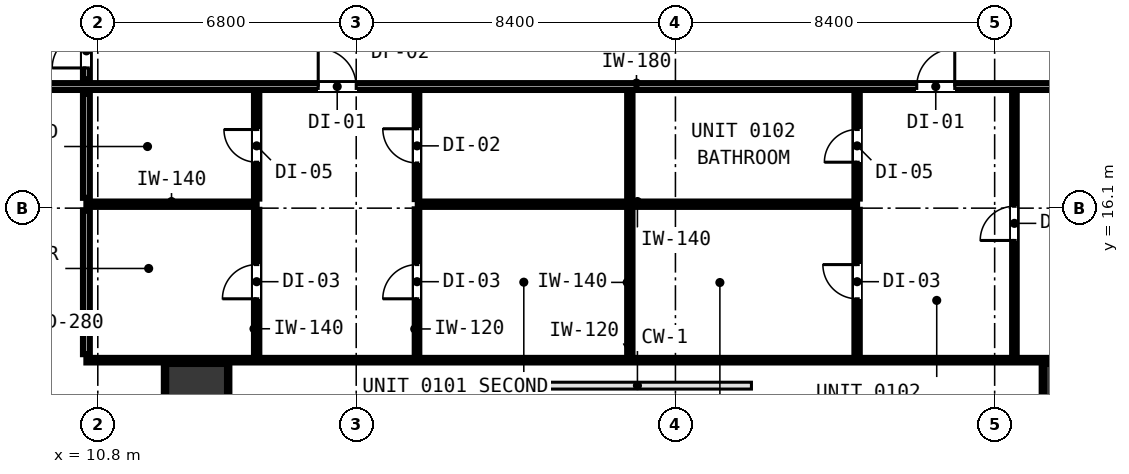
"""IFC4 building model, lengths in metres.
Left out: names, types, materials, properties, quantities, classifications, styles, units other than length and angle.
Written with IfcOpenShell. Run it as: python <this file> out.ifc"""

import sys

from ifc_helpers import new_model, si_unit, direction, frame, frame_2d, origin, origin_2d, place, context, subcontext, project, spatial, rectangle, extrude, element, fill, save


model = new_model("IFC4")
c1 = context("Model", 3, precision=1e-05, world=origin(), true_north=direction((0.0, 1.0)))
c2 = subcontext(c1, "Body", "Model", "MODEL_VIEW")
j1 = project(units=[si_unit("LENGTHUNIT", "METRE"), si_unit("PLANEANGLEUNIT", "RADIAN")], contexts=[c1])
p1 = place(None, origin())
s1 = spatial("IfcSite", under=j1, at=p1, CompositionType="ELEMENT")
p2 = place(p1, origin())
s2 = spatial("IfcBuilding", under=s1, at=p2, CompositionType="ELEMENT")
p3 = place(p2, frame((0.0, 0.0, 5.2)))
s3 = spatial("IfcBuildingStorey", under=s2, at=p3, CompositionType="ELEMENT", Elevation=5.2)
for number, where, z_axis, x_axis in (
    (1, (13.4, 11.2, 0.0), (0.0, 0.0, 1.0), (1.0, 0.0, 0.0)),
    (2, (36.5, 11.2, 0.0), (0.0, 0.0, 1.0), (1.0, 0.0, 0.0)),
):
    element("IfcColumn", number, at=place(p3, frame(where, z_axis=z_axis, x_axis=x_axis)), inside=s3, PredefinedType="COLUMN", context=c2, shape_type="SweptSolid", body=[
        extrude(rectangle(XDim=1.6, YDim=1.6, at=origin_2d()), origin(), (0.0, 0.0, 1.0), 4.2),
    ])
p4 = place(p3, frame((4.352, 19.3, 0.0), z_axis=(0.0, 0.0, 1.0), x_axis=(1.0, 0.0, 0.0)))
e3 = element("IfcWall", 3, at=p4, inside=s3, PredefinedType="PARTITIONING", context=c2, shape_type="SweptSolid", body=[
    extrude(rectangle(XDim=43.296, YDim=0.18, at=frame_2d((21.648, 0.0))), origin(), (0.0, 0.0, 1.0), 3.92),
])
p5 = place(p4, frame((12.248, 0.0, 0.0)))
e4 = element("IfcOpeningElement", 4, at=p5, cuts=e3, PredefinedType="OPENING", context=c2, shape_type="SweptSolid", body=[
    extrude(rectangle(XDim=1.0, YDim=2.15, at=frame_2d((0.5, 1.075))), frame((0.0, 0.1, 0.0), z_axis=(0.0, -1.0, 0.0), x_axis=(1.0, 0.0, 0.0)), (0.0, 0.0, 1.0), 0.2),
])
p6 = place(p4, frame((27.998, 0.0, 0.0)))
e5 = element("IfcOpeningElement", 5, at=p6, cuts=e3, PredefinedType="OPENING", context=c2, shape_type="SweptSolid", body=[
    extrude(rectangle(XDim=1.0, YDim=2.15, at=frame_2d((0.5, 1.075))), frame((0.0, 0.1, 0.0), z_axis=(0.0, -1.0, 0.0), x_axis=(1.0, 0.0, 0.0)), (0.0, 0.0, 1.0), 0.2),
])
p7 = place(p3, frame((10.5, 16.204, 0.0), z_axis=(0.0, 0.0, 1.0), x_axis=(1.0, 0.0, 0.0)))
e6 = element("IfcWall", 6, at=p7, inside=s3, PredefinedType="PARTITIONING", context=c2, shape_type="SweptSolid", body=[
    extrude(rectangle(XDim=4.48, YDim=0.14, at=frame_2d((2.24, 0.0))), origin(), (0.0, 0.0, 1.0), 3.92),
])
p8 = place(p3, frame((19.22, 16.204, 0.0), z_axis=(0.0, 0.0, 1.0), x_axis=(1.0, 0.0, 0.0)))
e7 = element("IfcWall", 7, at=p8, inside=s3, PredefinedType="PARTITIONING", context=c2, shape_type="SweptSolid", body=[
    extrude(rectangle(XDim=11.56, YDim=0.14, at=frame_2d((5.78, 0.0))), origin(), (0.0, 0.0, 1.0), 3.92),
])
p9 = place(p3, frame((10.5, 12.1, 0.0), z_axis=(0.0, 0.0, 1.0), x_axis=(1.0, 0.0, 0.0)))
e8 = element("IfcWall", 8, at=p9, inside=s3, PredefinedType="PARTITIONING", context=c2, shape_type="SweptSolid", body=[
    extrude(rectangle(XDim=28.7, YDim=0.12, at=frame_2d((14.35, 0.0))), origin(), (0.0, 0.0, 1.0), 3.92),
])
p10 = place(p3, frame((10.5, 12.258, 0.0), z_axis=(0.0, 0.0, 1.0), x_axis=(0.0, 1.0, 0.0)))
e9 = element("IfcWall", 9, at=p10, inside=s3, PredefinedType="PARTITIONING", context=c2, shape_type="SweptSolid", body=[
    extrude(rectangle(XDim=3.778, YDim=0.18, at=frame_2d((1.889, 0.0))), origin(), (0.0, 0.0, 1.0), 3.92),
])
p11 = place(p3, frame((10.5, 16.372, 0.0), z_axis=(0.0, 0.0, 1.0), x_axis=(0.0, 1.0, 0.0)))
e10 = element("IfcWall", 10, at=p11, inside=s3, PredefinedType="PARTITIONING", context=c2, shape_type="SweptSolid", body=[
    extrude(rectangle(XDim=2.74, YDim=0.18, at=frame_2d((1.37, 0.0))), origin(), (0.0, 0.0, 1.0), 3.92),
])
p12 = place(p3, frame((10.5, 19.488, 0.0), z_axis=(0.0, 0.0, 1.0), x_axis=(0.0, 1.0, 0.0)))
e11 = element("IfcWall", 11, at=p12, inside=s3, PredefinedType="PARTITIONING", context=c2, shape_type="SweptSolid", body=[
    extrude(rectangle(XDim=1.444, YDim=0.18, at=frame_2d((0.722, 0.0))), origin(), (0.0, 0.0, 1.0), 3.92),
])
p13 = place(p12, frame((0.301, 0.0, 0.0)))
e12 = element("IfcOpeningElement", 12, at=p13, cuts=e11, PredefinedType="OPENING", context=c2, shape_type="SweptSolid", body=[
    extrude(rectangle(XDim=0.9, YDim=2.1, at=frame_2d((0.45, 1.05))), frame((0.0, 0.1, 0.0), z_axis=(0.0, -1.0, 0.0), x_axis=(1.0, 0.0, 0.0)), (0.0, 0.0, 1.0), 0.2),
])
p14 = place(p3, frame((14.98, 12.238, 0.0), z_axis=(0.0, 0.0, 1.0), x_axis=(0.0, 1.0, 0.0)))
e13 = element("IfcWall", 13, at=p14, inside=s3, PredefinedType="PARTITIONING", context=c2, shape_type="SweptSolid", body=[
    extrude(rectangle(XDim=3.818, YDim=0.14, at=frame_2d((1.909, 0.0))), origin(), (0.0, 0.0, 1.0), 3.92),
])
p15 = place(p14, frame((1.477, 0.0, 0.0)))
e14 = element("IfcOpeningElement", 14, at=p15, cuts=e13, PredefinedType="OPENING", context=c2, shape_type="SweptSolid", body=[
    extrude(rectangle(XDim=0.9, YDim=2.1, at=frame_2d((0.45, 1.05))), frame((0.0, 0.08, 0.0), z_axis=(0.0, -1.0, 0.0), x_axis=(1.0, 0.0, 0.0)), (0.0, 0.0, 1.0), 0.16),
])
p16 = place(p3, frame((14.98, 16.352, 0.0), z_axis=(0.0, 0.0, 1.0), x_axis=(0.0, 1.0, 0.0)))
e15 = element("IfcWall", 15, at=p16, inside=s3, PredefinedType="PARTITIONING", context=c2, shape_type="SweptSolid", body=[
    extrude(rectangle(XDim=2.78, YDim=0.14, at=frame_2d((1.39, 0.0))), origin(), (0.0, 0.0, 1.0), 3.92),
])
p17 = place(p16, frame((0.957, 0.0, 0.0)))
e16 = element("IfcOpeningElement", 16, at=p17, cuts=e15, PredefinedType="OPENING", context=c2, shape_type="SweptSolid", body=[
    extrude(rectangle(XDim=0.86, YDim=2.02, at=frame_2d((0.43, 1.01))), frame((0.0, 0.08, 0.0), z_axis=(0.0, -1.0, 0.0), x_axis=(1.0, 0.0, 0.0)), (0.0, 0.0, 1.0), 0.16),
])
p18 = place(p3, frame((24.8, 12.238, 0.0), z_axis=(0.0, 0.0, 1.0), x_axis=(0.0, 1.0, 0.0)))
e17 = element("IfcWall", 17, at=p18, inside=s3, PredefinedType="PARTITIONING", context=c2, shape_type="SweptSolid", body=[
    extrude(rectangle(XDim=3.818, YDim=0.14, at=frame_2d((1.909, 0.0))), origin(), (0.0, 0.0, 1.0), 3.92),
])
p19 = place(p3, frame((24.8, 16.352, 0.0), z_axis=(0.0, 0.0, 1.0), x_axis=(0.0, 1.0, 0.0)))
e18 = element("IfcWall", 18, at=p19, inside=s3, PredefinedType="PARTITIONING", context=c2, shape_type="SweptSolid", body=[
    extrude(rectangle(XDim=2.78, YDim=0.14, at=frame_2d((1.39, 0.0))), origin(), (0.0, 0.0, 1.0), 3.92),
])
p20 = place(p3, frame((30.78, 12.238, 0.0), z_axis=(0.0, 0.0, 1.0), x_axis=(0.0, 1.0, 0.0)))
e19 = element("IfcWall", 19, at=p20, inside=s3, PredefinedType="PARTITIONING", context=c2, shape_type="SweptSolid", body=[
    extrude(rectangle(XDim=3.818, YDim=0.14, at=frame_2d((1.909, 0.0))), origin(), (0.0, 0.0, 1.0), 3.92),
])
p21 = place(p20, frame((1.477, 0.0, 0.0)))
e20 = element("IfcOpeningElement", 20, at=p21, cuts=e19, PredefinedType="OPENING", context=c2, shape_type="SweptSolid", body=[
    extrude(rectangle(XDim=0.9, YDim=2.1, at=frame_2d((0.45, 1.05))), frame((0.0, 0.08, 0.0), z_axis=(0.0, -1.0, 0.0), x_axis=(1.0, 0.0, 0.0)), (0.0, 0.0, 1.0), 0.16),
])
p22 = place(p3, frame((30.78, 16.352, 0.0), z_axis=(0.0, 0.0, 1.0), x_axis=(0.0, 1.0, 0.0)))
e21 = element("IfcWall", 21, at=p22, inside=s3, PredefinedType="PARTITIONING", context=c2, shape_type="SweptSolid", body=[
    extrude(rectangle(XDim=2.78, YDim=0.14, at=frame_2d((1.39, 0.0))), origin(), (0.0, 0.0, 1.0), 3.92),
])
p23 = place(p22, frame((0.957, 0.0, 0.0)))
e22 = element("IfcOpeningElement", 22, at=p23, cuts=e21, PredefinedType="OPENING", context=c2, shape_type="SweptSolid", body=[
    extrude(rectangle(XDim=0.86, YDim=2.02, at=frame_2d((0.43, 1.01))), frame((0.0, 0.08, 0.0), z_axis=(0.0, -1.0, 0.0), x_axis=(1.0, 0.0, 0.0)), (0.0, 0.0, 1.0), 0.16),
])
p24 = place(p3, frame((19.2, 12.228, 0.0), z_axis=(0.0, 0.0, 1.0), x_axis=(0.0, 1.0, 0.0)))
e23 = element("IfcWall", 23, at=p24, inside=s3, PredefinedType="PARTITIONING", context=c2, shape_type="SweptSolid", body=[
    extrude(rectangle(XDim=3.841, YDim=0.12, at=frame_2d((1.92, 0.0))), origin(), (0.0, 0.0, 1.0), 3.92),
])
p25 = place(p24, frame((1.487, 0.0, 0.0)))
e24 = element("IfcOpeningElement", 24, at=p25, cuts=e23, PredefinedType="OPENING", context=c2, shape_type="SweptSolid", body=[
    extrude(rectangle(XDim=0.9, YDim=2.1, at=frame_2d((0.45, 1.05))), frame((0.0, 0.07, 0.0), z_axis=(0.0, -1.0, 0.0), x_axis=(1.0, 0.0, 0.0)), (0.0, 0.0, 1.0), 0.14),
])
p26 = place(p3, frame((19.2, 16.339, 0.0), z_axis=(0.0, 0.0, 1.0), x_axis=(0.0, 1.0, 0.0)))
e25 = element("IfcWall", 25, at=p26, inside=s3, PredefinedType="PARTITIONING", context=c2, shape_type="SweptSolid", body=[
    extrude(rectangle(XDim=2.803, YDim=0.12, at=frame_2d((1.401, 0.0))), origin(), (0.0, 0.0, 1.0), 3.92),
])
p27 = place(p26, frame((0.95, 0.0, 0.0)))
e26 = element("IfcOpeningElement", 26, at=p27, cuts=e25, PredefinedType="OPENING", context=c2, shape_type="SweptSolid", body=[
    extrude(rectangle(XDim=0.9, YDim=2.1, at=frame_2d((0.45, 1.05))), frame((0.0, 0.07, 0.0), z_axis=(0.0, -1.0, 0.0), x_axis=(1.0, 0.0, 0.0)), (0.0, 0.0, 1.0), 0.14),
])
p28 = place(p3, frame((34.92, 12.228, 0.0), z_axis=(0.0, 0.0, 1.0), x_axis=(0.0, 1.0, 0.0)))
e27 = element("IfcWall", 27, at=p28, inside=s3, PredefinedType="PARTITIONING", context=c2, shape_type="SweptSolid", body=[
    extrude(rectangle(XDim=6.914, YDim=0.12, at=frame_2d((3.457, 0.0))), origin(), (0.0, 0.0, 1.0), 3.92),
])
p29 = place(p28, frame((3.022, 0.0, 0.0)))
e28 = element("IfcOpeningElement", 28, at=p29, cuts=e27, PredefinedType="OPENING", context=c2, shape_type="SweptSolid", body=[
    extrude(rectangle(XDim=0.9, YDim=2.1, at=frame_2d((0.45, 1.05))), frame((0.0, 0.07, 0.0), z_axis=(0.0, -1.0, 0.0), x_axis=(1.0, 0.0, 0.0)), (0.0, 0.0, 1.0), 0.14),
])
p30 = place(p3, frame((12.6, 12.032, 0.0), z_axis=(0.0, 0.0, 1.0), x_axis=(1.0, 0.0, 0.0)))
e29 = element("IfcWall", 29, at=p30, inside=s3, PredefinedType="PARTITIONING", context=c2, shape_type="SweptSolid", body=[
    extrude(rectangle(XDim=1.6, YDim=0.06, at=frame_2d((0.8, 0.0))), origin(), (0.0, 0.0, 1.0), 1.45),
])
for number, where, z_axis, x_axis in (
    (30, (12.568, 10.4, 0.0), (0.0, 0.0, 1.0), (0.0, 1.0, 0.0)),
    (31, (14.232, 10.4, 0.0), (0.0, 0.0, 1.0), (0.0, 1.0, 0.0)),
    (32, (35.7, 12.032, 0.0), (0.0, 0.0, 1.0), (1.0, 0.0, 0.0)),
    (33, (35.668, 10.4, 0.0), (0.0, 0.0, 1.0), (0.0, 1.0, 0.0)),
):
    element("IfcWall", number, at=place(p3, frame(where, z_axis=z_axis, x_axis=x_axis)), inside=s3, PredefinedType="PARTITIONING", context=c2, shape_type="SweptSolid", body=[
        extrude(rectangle(XDim=1.6, YDim=0.06, at=frame_2d((0.8, 0.0))), origin(), (0.0, 0.0, 1.0), 1.45),
    ])
p31 = place(p13, origin())
e34 = element("IfcDoor", 34, at=p31, inside=s3, OperationType="SINGLE_SWING_LEFT", PredefinedType="DOOR", context=c2, shape_type="SweptSolid", body=[
    extrude(rectangle(XDim=0.9, YDim=2.1, at=frame_2d((0.45, 1.05))), frame((0.0, 0.025, 0.0), z_axis=(0.0, -1.0, 0.0), x_axis=(1.0, 0.0, 0.0)), (0.0, 0.0, 1.0), 0.05),
])
fill(e12, e34)
p32 = place(p5, origin())
e35 = element("IfcDoor", 35, at=p32, inside=s3, OperationType="SINGLE_SWING_LEFT", PredefinedType="DOOR", context=c2, shape_type="SweptSolid", body=[
    extrude(rectangle(XDim=1.0, YDim=2.15, at=frame_2d((0.5, 1.075))), frame((0.0, 0.025, 0.0), z_axis=(0.0, -1.0, 0.0), x_axis=(1.0, 0.0, 0.0)), (0.0, 0.0, 1.0), 0.05),
])
fill(e4, e35)
p33 = place(p17, origin())
e36 = element("IfcDoor", 36, at=p33, inside=s3, OperationType="SINGLE_SWING_RIGHT", PredefinedType="DOOR", context=c2, shape_type="SweptSolid", body=[
    extrude(rectangle(XDim=0.86, YDim=2.02, at=frame_2d((0.43, 1.01))), frame((0.0, 0.025, 0.0), z_axis=(0.0, -1.0, 0.0), x_axis=(1.0, 0.0, 0.0)), (0.0, 0.0, 1.0), 0.05),
])
fill(e16, e36)
p34 = place(p15, origin())
e37 = element("IfcDoor", 37, at=p34, inside=s3, OperationType="SINGLE_SWING_LEFT", PredefinedType="DOOR", context=c2, shape_type="SweptSolid", body=[
    extrude(rectangle(XDim=0.9, YDim=2.1, at=frame_2d((0.45, 1.05))), frame((0.0, 0.025, 0.0), z_axis=(0.0, -1.0, 0.0), x_axis=(1.0, 0.0, 0.0)), (0.0, 0.0, 1.0), 0.05),
])
fill(e14, e37)
p35 = place(p27, origin())
e38 = element("IfcDoor", 38, at=p35, inside=s3, OperationType="SINGLE_SWING_RIGHT", PredefinedType="DOOR", context=c2, shape_type="SweptSolid", body=[
    extrude(rectangle(XDim=0.9, YDim=2.1, at=frame_2d((0.45, 1.05))), frame((0.0, 0.025, 0.0), z_axis=(0.0, -1.0, 0.0), x_axis=(1.0, 0.0, 0.0)), (0.0, 0.0, 1.0), 0.05),
])
fill(e26, e38)
p36 = place(p25, origin())
e39 = element("IfcDoor", 39, at=p36, inside=s3, OperationType="SINGLE_SWING_LEFT", PredefinedType="DOOR", context=c2, shape_type="SweptSolid", body=[
    extrude(rectangle(XDim=0.9, YDim=2.1, at=frame_2d((0.45, 1.05))), frame((0.0, 0.025, 0.0), z_axis=(0.0, -1.0, 0.0), x_axis=(1.0, 0.0, 0.0)), (0.0, 0.0, 1.0), 0.05),
])
fill(e24, e39)
p37 = place(p6, origin())
e40 = element("IfcDoor", 40, at=p37, inside=s3, OperationType="SINGLE_SWING_RIGHT", PredefinedType="DOOR", context=c2, shape_type="SweptSolid", body=[
    extrude(rectangle(XDim=1.0, YDim=2.15, at=frame_2d((0.5, 1.075))), frame((0.0, 0.025, 0.0), z_axis=(0.0, -1.0, 0.0), x_axis=(1.0, 0.0, 0.0)), (0.0, 0.0, 1.0), 0.05),
])
fill(e5, e40)
p38 = place(p23, origin())
e41 = element("IfcDoor", 41, at=p38, inside=s3, OperationType="SINGLE_SWING_LEFT", PredefinedType="DOOR", context=c2, shape_type="SweptSolid", body=[
    extrude(rectangle(XDim=0.86, YDim=2.02, at=frame_2d((0.43, 1.01))), frame((0.0, 0.025, 0.0), z_axis=(0.0, -1.0, 0.0), x_axis=(1.0, 0.0, 0.0)), (0.0, 0.0, 1.0), 0.05),
])
fill(e22, e41)
p39 = place(p21, origin())
e42 = element("IfcDoor", 42, at=p39, inside=s3, OperationType="SINGLE_SWING_RIGHT", PredefinedType="DOOR", context=c2, shape_type="SweptSolid", body=[
    extrude(rectangle(XDim=0.9, YDim=2.1, at=frame_2d((0.45, 1.05))), frame((0.0, 0.025, 0.0), z_axis=(0.0, -1.0, 0.0), x_axis=(1.0, 0.0, 0.0)), (0.0, 0.0, 1.0), 0.05),
])
fill(e20, e42)
p40 = place(p29, origin())
e43 = element("IfcDoor", 43, at=p40, inside=s3, OperationType="SINGLE_SWING_LEFT", PredefinedType="DOOR", context=c2, shape_type="SweptSolid", body=[
    extrude(rectangle(XDim=0.9, YDim=2.1, at=frame_2d((0.45, 1.05))), frame((0.0, 0.025, 0.0), z_axis=(0.0, -1.0, 0.0), x_axis=(1.0, 0.0, 0.0)), (0.0, 0.0, 1.0), 0.05),
])
fill(e28, e43)
save(model, sys.argv[1])
